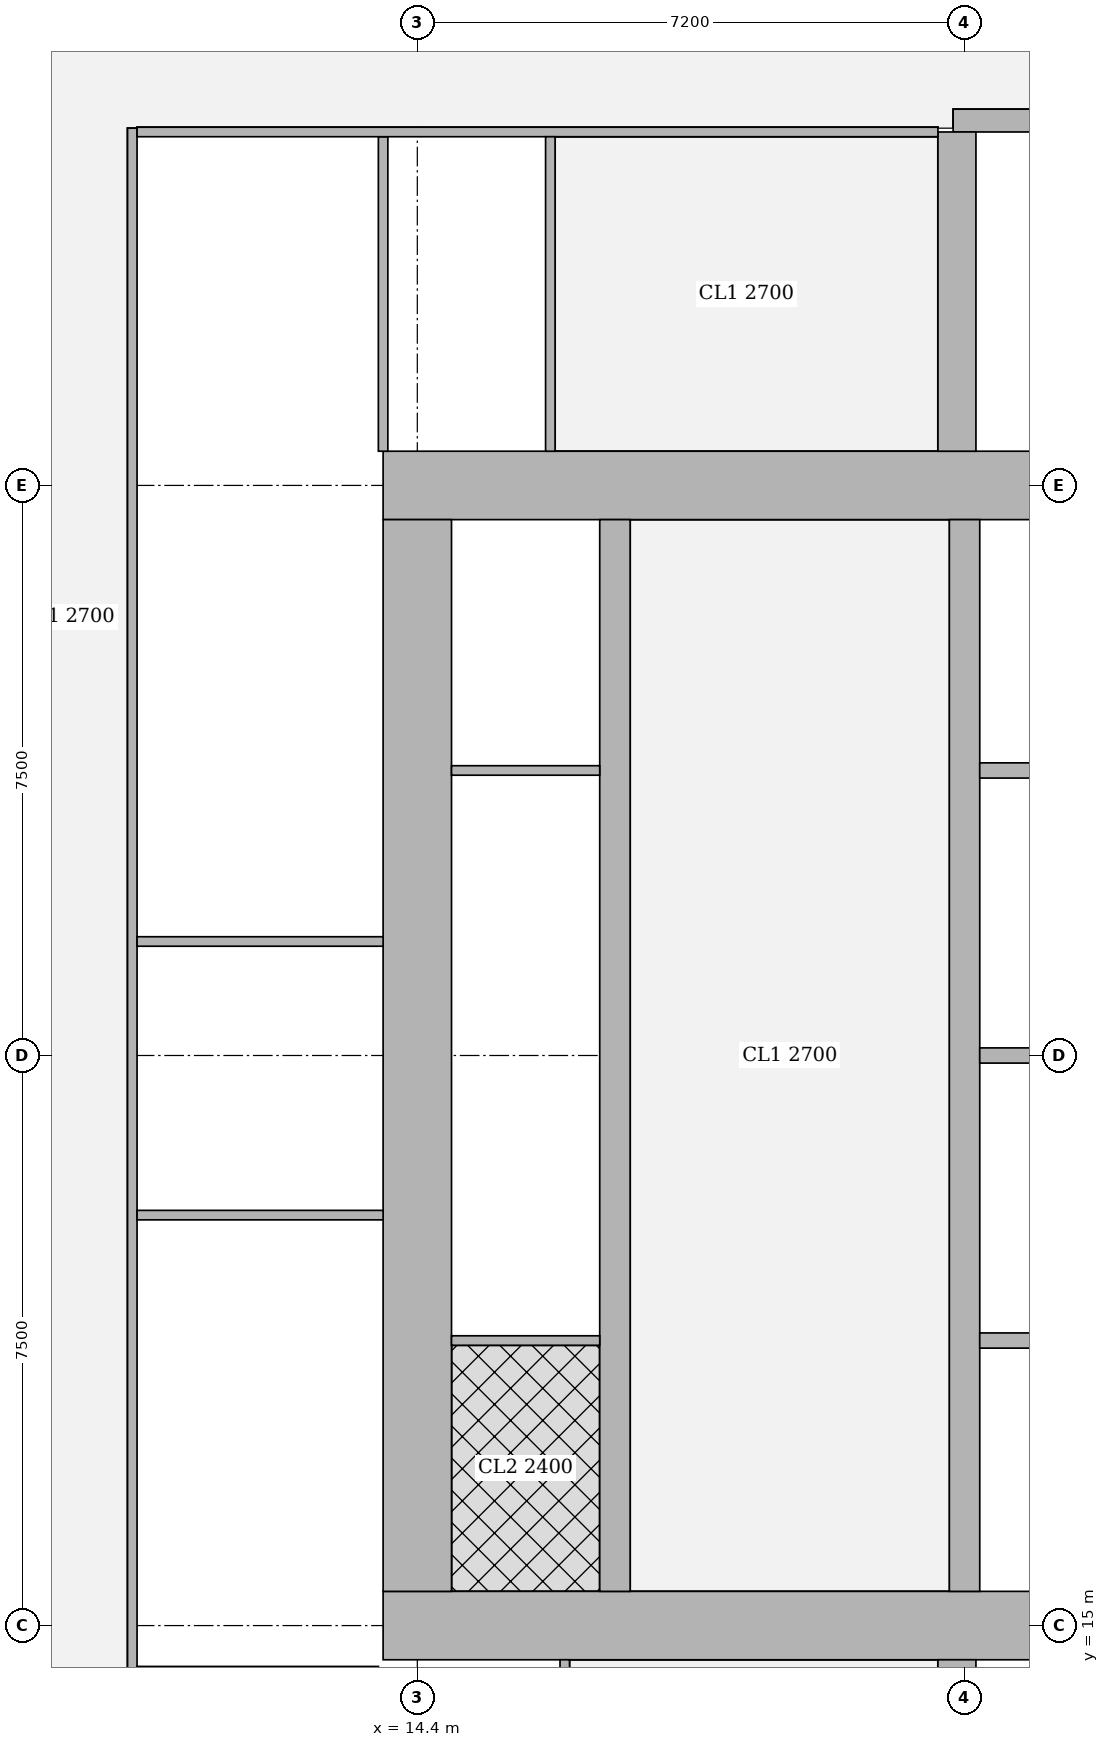
"""IFC4 building model, lengths in metres.
Left out: names, types, materials, properties, quantities, classifications, styles, units other than length and angle.
Written with IfcOpenShell. Run it as: python <this file> out.ifc"""

import sys

from ifc_helpers import new_model, si_unit, direction, frame, frame_2d, origin, place, context, subcontext, project, spatial, rectangle, extrude, element, fill, save


model = new_model("IFC4")
c1 = context("Model", 3, precision=1e-05, world=origin(), true_north=direction((0.0, 1.0)))
c2 = subcontext(c1, "Body", "Model", "MODEL_VIEW")
j1 = project(units=[si_unit("LENGTHUNIT", "METRE"), si_unit("PLANEANGLEUNIT", "RADIAN")], contexts=[c1])
p1 = place(None, origin())
s1 = spatial("IfcSite", under=j1, at=p1, CompositionType="ELEMENT")
p2 = place(p1, origin())
s2 = spatial("IfcBuilding", under=s1, at=p2, CompositionType="ELEMENT")
p3 = place(p2, frame((0.0, 0.0, 204.95)))
s3 = spatial("IfcBuildingStorey", under=s2, at=p3, CompositionType="ELEMENT", Elevation=204.95)
p4 = place(p3, frame((13.95, 15.0, 0.0), z_axis=(0.0, 0.0, 1.0), x_axis=(1.0, 0.0, 0.0)))
e1 = element("IfcWall", 1, at=p4, inside=s3, PredefinedType="SHEAR", context=c2, shape_type="SweptSolid", body=[
    extrude(rectangle(XDim=15.3, YDim=0.9, at=frame_2d((7.65, 0.0))), origin(), (0.0, 0.0, 1.0), 3.75),
])
p5 = place(p4, frame((4.45, 0.0, 0.0)))
e2 = element("IfcOpeningElement", 2, at=p5, cuts=e1, PredefinedType="OPENING", context=c2, shape_type="SweptSolid", body=[
    extrude(rectangle(XDim=1.8, YDim=2.1, at=frame_2d((0.9, 1.05))), frame((0.0, 0.46, 0.0), z_axis=(0.0, -1.0, 0.0), x_axis=(1.0, 0.0, 0.0)), (0.0, 0.0, 1.0), 0.92),
])
p6 = place(p4, frame((10.7, 0.0, 0.0)))
e3 = element("IfcOpeningElement", 3, at=p6, cuts=e1, PredefinedType="OPENING", context=c2, shape_type="SweptSolid", body=[
    extrude(rectangle(XDim=1.1, YDim=2.1, at=frame_2d((0.55, 1.05))), frame((0.0, 0.46, 0.0), z_axis=(0.0, -1.0, 0.0), x_axis=(1.0, 0.0, 0.0)), (0.0, 0.0, 1.0), 0.92),
])
p7 = place(p3, frame((13.95, 30.0, 0.0), z_axis=(0.0, 0.0, 1.0), x_axis=(1.0, 0.0, 0.0)))
e4 = element("IfcWall", 4, at=p7, inside=s3, PredefinedType="SHEAR", context=c2, shape_type="SweptSolid", body=[
    extrude(rectangle(XDim=15.3, YDim=0.9, at=frame_2d((7.65, 0.0))), origin(), (0.0, 0.0, 1.0), 3.75),
])
p8 = place(p7, frame((4.45, 0.0, 0.0)))
e5 = element("IfcOpeningElement", 5, at=p8, cuts=e4, PredefinedType="OPENING", context=c2, shape_type="SweptSolid", body=[
    extrude(rectangle(XDim=1.8, YDim=2.1, at=frame_2d((0.9, 1.05))), frame((0.0, 0.46, 0.0), z_axis=(0.0, -1.0, 0.0), x_axis=(1.0, 0.0, 0.0)), (0.0, 0.0, 1.0), 0.92),
])
p9 = place(p7, frame((10.7, 0.0, 0.0)))
e6 = element("IfcOpeningElement", 6, at=p9, cuts=e4, PredefinedType="OPENING", context=c2, shape_type="SweptSolid", body=[
    extrude(rectangle(XDim=1.1, YDim=2.1, at=frame_2d((0.55, 1.05))), frame((0.0, 0.46, 0.0), z_axis=(0.0, -1.0, 0.0), x_axis=(1.0, 0.0, 0.0)), (0.0, 0.0, 1.0), 0.92),
])
p10 = place(p3, frame((14.4, 15.45, 0.0), z_axis=(0.0, 0.0, 1.0), x_axis=(0.0, 1.0, 0.0)))
e7 = element("IfcWall", 7, at=p10, inside=s3, PredefinedType="SHEAR", context=c2, shape_type="SweptSolid", body=[
    extrude(rectangle(XDim=14.1, YDim=0.9, at=frame_2d((7.05, 0.0))), origin(), (0.0, 0.0, 1.0), 3.75),
])
p11 = place(p3, frame((17.0, 15.45, 0.0), z_axis=(0.0, 0.0, 1.0), x_axis=(0.0, 1.0, 0.0)))
e8 = element("IfcWall", 8, at=p11, inside=s3, PredefinedType="SHEAR", context=c2, shape_type="SweptSolid", body=[
    extrude(rectangle(XDim=14.1, YDim=0.4, at=frame_2d((7.05, 0.0))), origin(), (0.0, 0.0, 1.0), 3.75),
])
p12 = place(p11, frame((0.925, 0.0, 0.0)))
e9 = element("IfcOpeningElement", 9, at=p12, cuts=e8, PredefinedType="OPENING", context=c2, shape_type="SweptSolid", body=[
    extrude(rectangle(XDim=1.0, YDim=2.1, at=frame_2d((0.5, 1.05))), frame((0.0, 0.21, 0.0), z_axis=(0.0, -1.0, 0.0), x_axis=(1.0, 0.0, 0.0)), (0.0, 0.0, 1.0), 0.42),
])
p13 = place(p11, frame((4.675, 0.0, 0.0)))
e10 = element("IfcOpeningElement", 10, at=p13, cuts=e8, PredefinedType="OPENING", context=c2, shape_type="SweptSolid", body=[
    extrude(rectangle(XDim=1.0, YDim=2.1, at=frame_2d((0.5, 1.05))), frame((0.0, 0.21, 0.0), z_axis=(0.0, -1.0, 0.0), x_axis=(1.0, 0.0, 0.0)), (0.0, 0.0, 1.0), 0.42),
])
p14 = place(p11, frame((8.425, 0.0, 0.0)))
e11 = element("IfcOpeningElement", 11, at=p14, cuts=e8, PredefinedType="OPENING", context=c2, shape_type="SweptSolid", body=[
    extrude(rectangle(XDim=1.0, YDim=2.1, at=frame_2d((0.5, 1.05))), frame((0.0, 0.21, 0.0), z_axis=(0.0, -1.0, 0.0), x_axis=(1.0, 0.0, 0.0)), (0.0, 0.0, 1.0), 0.42),
])
p15 = place(p11, frame((12.175, 0.0, 0.0)))
e12 = element("IfcOpeningElement", 12, at=p15, cuts=e8, PredefinedType="OPENING", context=c2, shape_type="SweptSolid", body=[
    extrude(rectangle(XDim=1.0, YDim=2.1, at=frame_2d((0.5, 1.05))), frame((0.0, 0.21, 0.0), z_axis=(0.0, -1.0, 0.0), x_axis=(1.0, 0.0, 0.0)), (0.0, 0.0, 1.0), 0.42),
])
p16 = place(p3, frame((21.6, 15.45, 0.0), z_axis=(0.0, 0.0, 1.0), x_axis=(0.0, 1.0, 0.0)))
e13 = element("IfcWall", 13, at=p16, inside=s3, PredefinedType="SHEAR", context=c2, shape_type="SweptSolid", body=[
    extrude(rectangle(XDim=14.1, YDim=0.4, at=frame_2d((7.05, 0.0))), origin(), (0.0, 0.0, 1.0), 3.75),
])
p17 = place(p16, frame((0.875, 0.0, 0.0)))
e14 = element("IfcOpeningElement", 14, at=p17, cuts=e13, PredefinedType="OPENING", context=c2, shape_type="SweptSolid", body=[
    extrude(rectangle(XDim=1.1, YDim=2.1, at=frame_2d((0.55, 1.05))), frame((0.0, 0.21, 0.0), z_axis=(0.0, -1.0, 0.0), x_axis=(1.0, 0.0, 0.0)), (0.0, 0.0, 1.0), 0.42),
])
p18 = place(p16, frame((4.625, 0.0, 0.0)))
e15 = element("IfcOpeningElement", 15, at=p18, cuts=e13, PredefinedType="OPENING", context=c2, shape_type="SweptSolid", body=[
    extrude(rectangle(XDim=1.1, YDim=2.1, at=frame_2d((0.55, 1.05))), frame((0.0, 0.21, 0.0), z_axis=(0.0, -1.0, 0.0), x_axis=(1.0, 0.0, 0.0)), (0.0, 0.0, 1.0), 0.42),
])
p19 = place(p16, frame((8.375, 0.0, 0.0)))
e16 = element("IfcOpeningElement", 16, at=p19, cuts=e13, PredefinedType="OPENING", context=c2, shape_type="SweptSolid", body=[
    extrude(rectangle(XDim=1.1, YDim=2.1, at=frame_2d((0.55, 1.05))), frame((0.0, 0.21, 0.0), z_axis=(0.0, -1.0, 0.0), x_axis=(1.0, 0.0, 0.0)), (0.0, 0.0, 1.0), 0.42),
])
p20 = place(p16, frame((12.125, 0.0, 0.0)))
e17 = element("IfcOpeningElement", 17, at=p20, cuts=e13, PredefinedType="OPENING", context=c2, shape_type="SweptSolid", body=[
    extrude(rectangle(XDim=1.1, YDim=2.1, at=frame_2d((0.55, 1.05))), frame((0.0, 0.21, 0.0), z_axis=(0.0, -1.0, 0.0), x_axis=(1.0, 0.0, 0.0)), (0.0, 0.0, 1.0), 0.42),
])
p21 = place(p3, frame((21.5, 10.35, 0.0), z_axis=(0.0, 0.0, 1.0), x_axis=(0.0, 1.0, 0.0)))
e18 = element("IfcWall", 18, at=p21, inside=s3, PredefinedType="SHEAR", context=c2, shape_type="SweptSolid", body=[
    extrude(rectangle(XDim=4.2, YDim=0.5, at=frame_2d((2.1, 0.0))), origin(), (0.0, 0.0, 1.0), 3.75),
])
p22 = place(p3, frame((21.45, 34.8, 0.0), z_axis=(0.0, 0.0, 1.0), x_axis=(1.0, 0.0, 0.0)))
e19 = element("IfcWall", 19, at=p22, inside=s3, PredefinedType="SHEAR", context=c2, shape_type="SweptSolid", body=[
    extrude(rectangle(XDim=7.5, YDim=0.3, at=frame_2d((3.75, 0.0))), origin(), (0.0, 0.0, 1.0), 3.75),
])
p23 = place(p22, frame((0.5, 0.0, 0.0)))
e20 = element("IfcOpeningElement", 20, at=p23, cuts=e19, PredefinedType="OPENING", context=c2, shape_type="SweptSolid", body=[
    extrude(rectangle(XDim=1.1, YDim=2.1, at=frame_2d((0.55, 1.05))), frame((0.0, 0.16, 0.0), z_axis=(0.0, -1.0, 0.0), x_axis=(1.0, 0.0, 0.0)), (0.0, 0.0, 1.0), 0.32),
])
p24 = place(p3, frame((21.5, 30.45, 0.0), z_axis=(0.0, 0.0, 1.0), x_axis=(0.0, 1.0, 0.0)))
e21 = element("IfcWall", 21, at=p24, inside=s3, PredefinedType="SHEAR", context=c2, shape_type="SweptSolid", body=[
    extrude(rectangle(XDim=4.2, YDim=0.5, at=frame_2d((2.1, 0.0))), origin(), (0.0, 0.0, 1.0), 3.75),
])
p25 = place(p3, frame((10.65, 10.3, 0.0), z_axis=(0.0, 0.0, 1.0), x_axis=(0.0, 1.0, 0.0)))
e22 = element("IfcWall", 22, at=p25, inside=s3, PredefinedType="PARTITIONING", context=c2, shape_type="SweptSolid", body=[
    extrude(rectangle(XDim=24.4, YDim=0.125, at=frame_2d((12.2, 0.0))), origin(), (0.0, 0.0, 1.0), 3.5),
])
p26 = place(p25, frame((1.55, 0.0, 0.0)))
e23 = element("IfcOpeningElement", 23, at=p26, cuts=e22, PredefinedType="OPENING", context=c2, shape_type="SweptSolid", body=[
    extrude(rectangle(XDim=1.0, YDim=2.1, at=frame_2d((0.5, 1.05))), frame((0.0, 0.073, 0.0), z_axis=(0.0, -1.0, 0.0), x_axis=(1.0, 0.0, 0.0)), (0.0, 0.0, 1.0), 0.145),
])
p27 = place(p25, frame((6.6, 0.0, 0.0)))
e24 = element("IfcOpeningElement", 24, at=p27, cuts=e22, PredefinedType="OPENING", context=c2, shape_type="SweptSolid", body=[
    extrude(rectangle(XDim=1.0, YDim=2.1, at=frame_2d((0.5, 1.05))), frame((0.0, 0.073, 0.0), z_axis=(0.0, -1.0, 0.0), x_axis=(1.0, 0.0, 0.0)), (0.0, 0.0, 1.0), 0.145),
])
p28 = place(p25, frame((11.4, 0.0, 0.0)))
e25 = element("IfcOpeningElement", 25, at=p28, cuts=e22, PredefinedType="OPENING", context=c2, shape_type="SweptSolid", body=[
    extrude(rectangle(XDim=1.0, YDim=2.1, at=frame_2d((0.5, 1.05))), frame((0.0, 0.073, 0.0), z_axis=(0.0, -1.0, 0.0), x_axis=(1.0, 0.0, 0.0)), (0.0, 0.0, 1.0), 0.145),
])
p29 = place(p25, frame((18.55, 0.0, 0.0)))
e26 = element("IfcOpeningElement", 26, at=p29, cuts=e22, PredefinedType="OPENING", context=c2, shape_type="SweptSolid", body=[
    extrude(rectangle(XDim=1.0, YDim=2.1, at=frame_2d((0.5, 1.05))), frame((0.0, 0.073, 0.0), z_axis=(0.0, -1.0, 0.0), x_axis=(1.0, 0.0, 0.0)), (0.0, 0.0, 1.0), 0.145),
])
p30 = place(p3, frame((10.713, 14.4, 0.0), z_axis=(0.0, 0.0, 1.0), x_axis=(1.0, 0.0, 0.0)))
e27 = element("IfcWall", 27, at=p30, inside=s3, PredefinedType="PARTITIONING", context=c2, shape_type="SweptSolid", body=[
    extrude(rectangle(XDim=3.175, YDim=0.125, at=frame_2d((1.587, 0.0))), origin(), (0.0, 0.0, 1.0), 3.5),
])
for number, where, z_axis, x_axis in (
    (28, (10.713, 20.4, 0.0), (0.0, 0.0, 1.0), (1.0, 0.0, 0.0)),
    (29, (10.713, 24.0, 0.0), (0.0, 0.0, 1.0), (1.0, 0.0, 0.0)),
):
    element("IfcWall", number, at=place(p3, frame(where, z_axis=z_axis, x_axis=x_axis)), inside=s3, PredefinedType="PARTITIONING", context=c2, shape_type="SweptSolid", body=[
        extrude(rectangle(XDim=3.237, YDim=0.125, at=frame_2d((1.619, 0.0))), origin(), (0.0, 0.0, 1.0), 3.5),
    ])
p31 = place(p3, frame((13.95, 30.45, 0.0), z_axis=(0.0, 0.0, 1.0), x_axis=(0.0, 1.0, 0.0)))
e30 = element("IfcWall", 30, at=p31, inside=s3, PredefinedType="PARTITIONING", context=c2, shape_type="SweptSolid", body=[
    extrude(rectangle(XDim=4.137, YDim=0.125, at=frame_2d((2.068, 0.0))), origin(), (0.0, 0.0, 1.0), 3.5),
])
p32 = place(p3, frame((10.713, 34.65, 0.0), z_axis=(0.0, 0.0, 1.0), x_axis=(1.0, 0.0, 0.0)))
e31 = element("IfcWall", 31, at=p32, inside=s3, PredefinedType="PARTITIONING", context=c2, shape_type="SweptSolid", body=[
    extrude(rectangle(XDim=10.537, YDim=0.125, at=frame_2d((5.269, 0.0))), origin(), (0.0, 0.0, 1.0), 3.5),
])
p33 = place(p32, frame((7.187, 0.0, 0.0)))
e32 = element("IfcOpeningElement", 32, at=p33, cuts=e31, PredefinedType="OPENING", context=c2, shape_type="SweptSolid", body=[
    extrude(rectangle(XDim=1.8, YDim=2.1, at=frame_2d((0.9, 1.05))), frame((0.0, 0.073, 0.0), z_axis=(0.0, -1.0, 0.0), x_axis=(1.0, 0.0, 0.0)), (0.0, 0.0, 1.0), 0.145),
])
p34 = place(p3, frame((16.34, 10.413, 0.0), z_axis=(0.0, 0.0, 1.0), x_axis=(0.0, 1.0, 0.0)))
e33 = element("IfcWall", 33, at=p34, inside=s3, PredefinedType="PARTITIONING", context=c2, shape_type="SweptSolid", body=[
    extrude(rectangle(XDim=4.137, YDim=0.125, at=frame_2d((2.068, 0.0))), origin(), (0.0, 0.0, 1.0), 3.5),
])
p35 = place(p34, frame((1.512, 0.0, 0.0)))
e34 = element("IfcOpeningElement", 34, at=p35, cuts=e33, PredefinedType="OPENING", context=c2, shape_type="SweptSolid", body=[
    extrude(rectangle(XDim=1.0, YDim=2.1, at=frame_2d((0.5, 1.05))), frame((0.0, 0.073, 0.0), z_axis=(0.0, -1.0, 0.0), x_axis=(1.0, 0.0, 0.0)), (0.0, 0.0, 1.0), 0.145),
])
p36 = place(p3, frame((16.15, 30.45, 0.0), z_axis=(0.0, 0.0, 1.0), x_axis=(0.0, 1.0, 0.0)))
e35 = element("IfcWall", 35, at=p36, inside=s3, PredefinedType="PARTITIONING", context=c2, shape_type="SweptSolid", body=[
    extrude(rectangle(XDim=4.137, YDim=0.125, at=frame_2d((2.068, 0.0))), origin(), (0.0, 0.0, 1.0), 3.5),
])
p37 = place(p36, frame((1.625, 0.0, 0.0)))
e36 = element("IfcOpeningElement", 36, at=p37, cuts=e35, PredefinedType="OPENING", context=c2, shape_type="SweptSolid", body=[
    extrude(rectangle(XDim=1.0, YDim=2.1, at=frame_2d((0.5, 1.05))), frame((0.0, 0.073, 0.0), z_axis=(0.0, -1.0, 0.0), x_axis=(1.0, 0.0, 0.0)), (0.0, 0.0, 1.0), 0.145),
])
for number, where, z_axis, x_axis in (
    (37, (14.85, 18.75, 0.0), (0.0, 0.0, 1.0), (1.0, 0.0, 0.0)),
    (38, (14.85, 26.25, 0.0), (0.0, 0.0, 1.0), (1.0, 0.0, 0.0)),
):
    element("IfcWall", number, at=place(p3, frame(where, z_axis=z_axis, x_axis=x_axis)), inside=s3, PredefinedType="PARTITIONING", context=c2, shape_type="SweptSolid", body=[
        extrude(rectangle(XDim=1.95, YDim=0.125, at=frame_2d((0.975, 0.0))), origin(), (0.0, 0.0, 1.0), 3.5),
    ])
for number, where, z_axis, x_axis in (
    (39, (21.8, 18.75, 0.0), (0.0, 0.0, 1.0), (1.0, 0.0, 0.0)),
    (40, (21.8, 22.5, 0.0), (0.0, 0.0, 1.0), (1.0, 0.0, 0.0)),
    (41, (21.8, 26.25, 0.0), (0.0, 0.0, 1.0), (1.0, 0.0, 0.0)),
):
    element("IfcWall", number, at=place(p3, frame(where, z_axis=z_axis, x_axis=x_axis)), inside=s3, PredefinedType="SOLIDWALL", context=c2, shape_type="SweptSolid", body=[
        extrude(rectangle(XDim=2.2, YDim=0.2, at=frame_2d((1.1, 0.0))), origin(), (0.0, 0.0, 1.0), 3.5),
    ])
p38 = place(p27, origin())
e42 = element("IfcDoor", 42, at=p38, inside=s3, OperationType="SINGLE_SWING_LEFT", PredefinedType="DOOR", context=c2, shape_type="SweptSolid", body=[
    extrude(rectangle(XDim=1.0, YDim=2.1, at=frame_2d((0.5, 1.05))), frame((0.0, 0.025, 0.0), z_axis=(0.0, -1.0, 0.0), x_axis=(1.0, 0.0, 0.0)), (0.0, 0.0, 1.0), 0.05),
])
fill(e24, e42)
p39 = place(p28, origin())
e43 = element("IfcDoor", 43, at=p39, inside=s3, OperationType="SINGLE_SWING_LEFT", PredefinedType="DOOR", context=c2, shape_type="SweptSolid", body=[
    extrude(rectangle(XDim=1.0, YDim=2.1, at=frame_2d((0.5, 1.05))), frame((0.0, 0.025, 0.0), z_axis=(0.0, -1.0, 0.0), x_axis=(1.0, 0.0, 0.0)), (0.0, 0.0, 1.0), 0.05),
])
fill(e25, e43)
p40 = place(p29, origin())
e44 = element("IfcDoor", 44, at=p40, inside=s3, OperationType="SINGLE_SWING_LEFT", PredefinedType="DOOR", context=c2, shape_type="SweptSolid", body=[
    extrude(rectangle(XDim=1.0, YDim=2.1, at=frame_2d((0.5, 1.05))), frame((0.0, 0.025, 0.0), z_axis=(0.0, -1.0, 0.0), x_axis=(1.0, 0.0, 0.0)), (0.0, 0.0, 1.0), 0.05),
])
fill(e26, e44)
p41 = place(p37, origin())
e45 = element("IfcDoor", 45, at=p41, inside=s3, OperationType="SINGLE_SWING_RIGHT", PredefinedType="DOOR", context=c2, shape_type="SweptSolid", body=[
    extrude(rectangle(XDim=1.0, YDim=2.1, at=frame_2d((0.5, 1.05))), frame((0.0, 0.025, 0.0), z_axis=(0.0, -1.0, 0.0), x_axis=(1.0, 0.0, 0.0)), (0.0, 0.0, 1.0), 0.05),
])
fill(e36, e45)
p42 = place(p33, origin())
e46 = element("IfcDoor", 46, at=p42, inside=s3, OperationType="DOUBLE_DOOR_SINGLE_SWING", PredefinedType="DOOR", context=c2, shape_type="SweptSolid", body=[
    extrude(rectangle(XDim=1.8, YDim=2.1, at=frame_2d((0.9, 1.05))), frame((0.0, 0.025, 0.0), z_axis=(0.0, -1.0, 0.0), x_axis=(1.0, 0.0, 0.0)), (0.0, 0.0, 1.0), 0.05),
])
fill(e32, e46)
p43 = place(p12, origin())
e47 = element("IfcDoor", 47, at=p43, inside=s3, OperationType="SINGLE_SWING_LEFT", PredefinedType="DOOR", context=c2, shape_type="SweptSolid", body=[
    extrude(rectangle(XDim=1.0, YDim=2.1, at=frame_2d((0.5, 1.05))), frame((0.0, 0.025, 0.0), z_axis=(0.0, -1.0, 0.0), x_axis=(1.0, 0.0, 0.0)), (0.0, 0.0, 1.0), 0.05),
])
fill(e9, e47)
p44 = place(p13, origin())
e48 = element("IfcDoor", 48, at=p44, inside=s3, OperationType="SINGLE_SWING_LEFT", PredefinedType="DOOR", context=c2, shape_type="SweptSolid", body=[
    extrude(rectangle(XDim=1.0, YDim=2.1, at=frame_2d((0.5, 1.05))), frame((0.0, 0.025, 0.0), z_axis=(0.0, -1.0, 0.0), x_axis=(1.0, 0.0, 0.0)), (0.0, 0.0, 1.0), 0.05),
])
fill(e10, e48)
p45 = place(p14, origin())
e49 = element("IfcDoor", 49, at=p45, inside=s3, OperationType="SINGLE_SWING_RIGHT", PredefinedType="DOOR", context=c2, shape_type="SweptSolid", body=[
    extrude(rectangle(XDim=1.0, YDim=2.1, at=frame_2d((0.5, 1.05))), frame((0.0, 0.025, 0.0), z_axis=(0.0, -1.0, 0.0), x_axis=(1.0, 0.0, 0.0)), (0.0, 0.0, 1.0), 0.05),
])
fill(e11, e49)
p46 = place(p15, origin())
e50 = element("IfcDoor", 50, at=p46, inside=s3, OperationType="SINGLE_SWING_RIGHT", PredefinedType="DOOR", context=c2, shape_type="SweptSolid", body=[
    extrude(rectangle(XDim=1.0, YDim=2.1, at=frame_2d((0.5, 1.05))), frame((0.0, 0.025, 0.0), z_axis=(0.0, -1.0, 0.0), x_axis=(1.0, 0.0, 0.0)), (0.0, 0.0, 1.0), 0.05),
])
fill(e12, e50)
p47 = place(p5, origin())
e51 = element("IfcDoor", 51, at=p47, inside=s3, OperationType="DOUBLE_DOOR_SINGLE_SWING", PredefinedType="DOOR", context=c2, shape_type="SweptSolid", body=[
    extrude(rectangle(XDim=1.8, YDim=2.1, at=frame_2d((0.9, 1.05))), frame((0.0, 0.025, 0.0), z_axis=(0.0, -1.0, 0.0), x_axis=(1.0, 0.0, 0.0)), (0.0, 0.0, 1.0), 0.05),
])
fill(e2, e51)
p48 = place(p8, origin())
e52 = element("IfcDoor", 52, at=p48, inside=s3, OperationType="DOUBLE_DOOR_SINGLE_SWING", PredefinedType="DOOR", context=c2, shape_type="SweptSolid", body=[
    extrude(rectangle(XDim=1.8, YDim=2.1, at=frame_2d((0.9, 1.05))), frame((0.0, 0.025, 0.0), z_axis=(0.0, -1.0, 0.0), x_axis=(1.0, 0.0, 0.0)), (0.0, 0.0, 1.0), 0.05),
])
fill(e5, e52)
p49 = place(p17, origin())
e53 = element("IfcDoor", 53, at=p49, inside=s3, OperationType="DOUBLE_DOOR_SLIDING", PredefinedType="DOOR", context=c2, shape_type="SweptSolid", body=[
    extrude(rectangle(XDim=1.1, YDim=2.1, at=frame_2d((0.55, 1.05))), frame((0.0, 0.025, 0.0), z_axis=(0.0, -1.0, 0.0), x_axis=(1.0, 0.0, 0.0)), (0.0, 0.0, 1.0), 0.05),
])
fill(e14, e53)
p50 = place(p18, origin())
e54 = element("IfcDoor", 54, at=p50, inside=s3, OperationType="DOUBLE_DOOR_SLIDING", PredefinedType="DOOR", context=c2, shape_type="SweptSolid", body=[
    extrude(rectangle(XDim=1.1, YDim=2.1, at=frame_2d((0.55, 1.05))), frame((0.0, 0.025, 0.0), z_axis=(0.0, -1.0, 0.0), x_axis=(1.0, 0.0, 0.0)), (0.0, 0.0, 1.0), 0.05),
])
fill(e15, e54)
p51 = place(p19, origin())
e55 = element("IfcDoor", 55, at=p51, inside=s3, OperationType="DOUBLE_DOOR_SLIDING", PredefinedType="DOOR", context=c2, shape_type="SweptSolid", body=[
    extrude(rectangle(XDim=1.1, YDim=2.1, at=frame_2d((0.55, 1.05))), frame((0.0, 0.025, 0.0), z_axis=(0.0, -1.0, 0.0), x_axis=(1.0, 0.0, 0.0)), (0.0, 0.0, 1.0), 0.05),
])
fill(e16, e55)
p52 = place(p20, origin())
e56 = element("IfcDoor", 56, at=p52, inside=s3, OperationType="DOUBLE_DOOR_SLIDING", PredefinedType="DOOR", context=c2, shape_type="SweptSolid", body=[
    extrude(rectangle(XDim=1.1, YDim=2.1, at=frame_2d((0.55, 1.05))), frame((0.0, 0.025, 0.0), z_axis=(0.0, -1.0, 0.0), x_axis=(1.0, 0.0, 0.0)), (0.0, 0.0, 1.0), 0.05),
])
fill(e17, e56)
p53 = place(p23, origin())
e57 = element("IfcDoor", 57, at=p53, inside=s3, OperationType="SINGLE_SWING_RIGHT", PredefinedType="DOOR", context=c2, shape_type="SweptSolid", body=[
    extrude(rectangle(XDim=1.1, YDim=2.1, at=frame_2d((0.55, 1.05))), frame((0.0, 0.025, 0.0), z_axis=(0.0, -1.0, 0.0), x_axis=(1.0, 0.0, 0.0)), (0.0, 0.0, 1.0), 0.05),
])
fill(e20, e57)
save(model, sys.argv[1])
